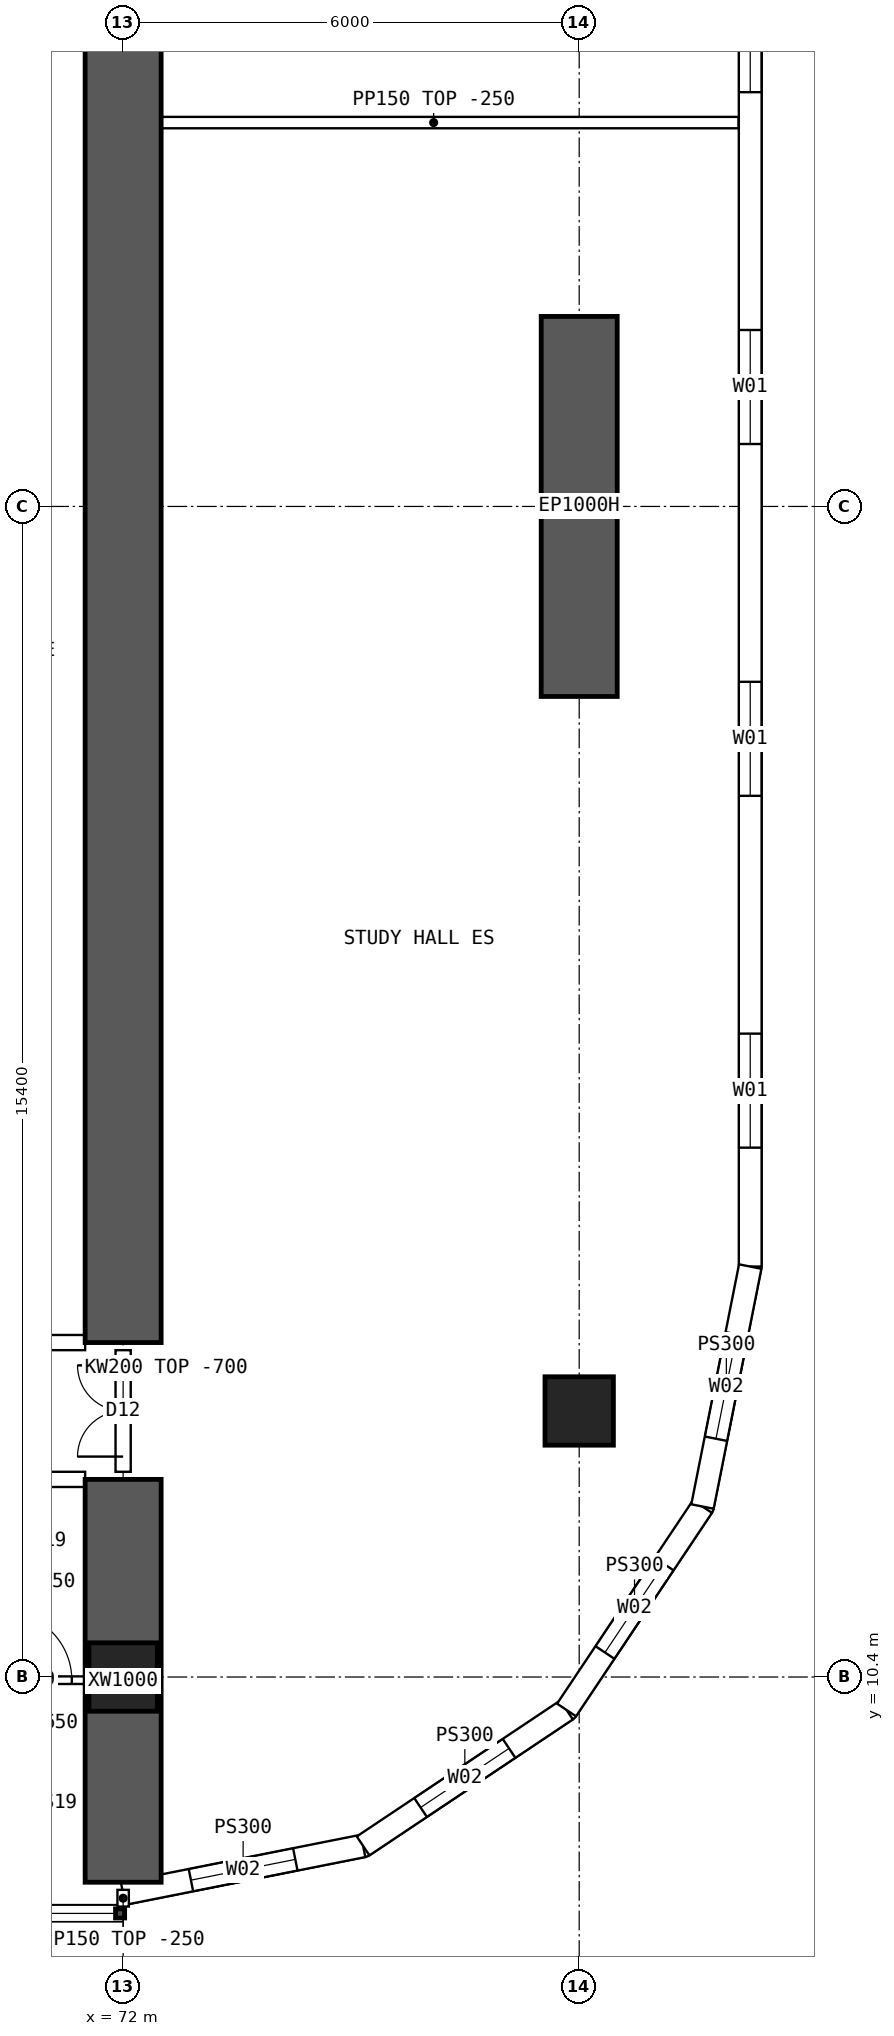
"""IFC4 building model, lengths in metres.
Left out: names, types, materials, properties, quantities, classifications, styles, units other than length and angle.
Written with IfcOpenShell. Run it as: python <this file> out.ifc"""

import sys

from ifc_helpers import new_model, si_unit, direction, frame, frame_2d, origin, origin_2d, place, context, subcontext, project, spatial, polyline, rectangle, hollow_rectangle, outline, extrude, element, fill, save


model = new_model("IFC4")
c1 = context("Model", 3, precision=1e-05, world=origin(), true_north=direction((0.0, 1.0)))
c2 = subcontext(c1, "Body", "Model", "MODEL_VIEW")
j1 = project(units=[si_unit("LENGTHUNIT", "METRE"), si_unit("PLANEANGLEUNIT", "RADIAN")], contexts=[c1])
p1 = place(None, origin())
s1 = spatial("IfcSite", under=j1, at=p1, CompositionType="ELEMENT")
p2 = place(p1, origin())
s2 = spatial("IfcBuilding", under=s1, at=p2, CompositionType="ELEMENT")
p3 = place(p2, frame((0.0, 0.0, 61.45)))
s3 = spatial("IfcBuildingStorey", under=s2, at=p3, CompositionType="ELEMENT", Elevation=61.45)
for number, where, z_axis, x_axis in (
    (1, (72.0, 10.4, 0.0), (0.0, 0.0, 1.0), (1.0, 0.0, 0.0)),
    (2, (78.0, 13.9, 0.0), (0.0, 0.0, 1.0), (1.0, 0.0, 0.0)),
):
    element("IfcColumn", number, at=place(p3, frame(where, z_axis=z_axis, x_axis=x_axis)), inside=s3, PredefinedType="COLUMN", context=c2, shape_type="SweptSolid", body=[
        extrude(hollow_rectangle(XDim=0.9, YDim=0.9, WallThickness=0.09, at=origin_2d()), origin(), (0.0, 0.0, 1.0), 3.75),
    ])
p4 = place(p3, frame((78.0, 23.3, 0.0), z_axis=(0.0, 0.0, 1.0), x_axis=(0.0, 1.0, 0.0)))
e3 = element("IfcWall", 3, at=p4, inside=s3, PredefinedType="SHEAR", context=c2, shape_type="SweptSolid", body=[
    extrude(rectangle(XDim=5.0, YDim=1.0, at=frame_2d((2.5, 0.0))), origin(), (0.0, 0.0, 1.0), 3.75),
])
p5 = place(p3, frame((72.0, 7.7, 0.0), z_axis=(0.0, 0.0, 1.0), x_axis=(0.0, 1.0, 0.0)))
e4 = element("IfcWall", 4, at=p5, inside=s3, PredefinedType="SHEAR", context=c2, shape_type="SweptSolid", body=[
    extrude(rectangle(XDim=5.3, YDim=1.0, at=frame_2d((2.65, 0.0))), origin(), (0.0, 0.0, 1.0), 3.75),
])
p6 = place(p3, frame((72.0, 14.8, 0.0), z_axis=(0.0, 0.0, 1.0), x_axis=(0.0, 1.0, 0.0)))
e5 = element("IfcWall", 5, at=p6, inside=s3, PredefinedType="SHEAR", context=c2, shape_type="SweptSolid", body=[
    extrude(rectangle(XDim=34.4, YDim=1.0, at=frame_2d((17.2, 0.0))), origin(), (0.0, 0.0, 1.0), 3.75),
])
p7 = place(p3, frame((80.25, 15.8, 0.0), z_axis=(0.0, 0.0, 1.0), x_axis=(0.0, 1.0, 0.0)))
e6 = element("IfcWall", 6, at=p7, inside=s3, PredefinedType="SOLIDWALL", context=c2, shape_type="SweptSolid", body=[
    extrude(outline(polyline([(-0.015, -0.15), (32.415, -0.15), (32.385, 0.15), (0.015, 0.15), (-0.015, -0.15)])), origin(), (0.0, 0.0, 1.0), 3.5),
])
p8 = place(p7, frame((1.564, 0.0, 0.9)))
e7 = element("IfcOpeningElement", 7, at=p8, cuts=e6, PredefinedType="OPENING", context=c2, shape_type="SweptSolid", body=[
    extrude(rectangle(XDim=1.5, YDim=2.0, at=frame_2d((0.75, 1.0))), frame((0.0, 0.16, 0.0), z_axis=(0.0, -1.0, 0.0), x_axis=(1.0, 0.0, 0.0)), (0.0, 0.0, 1.0), 0.32),
])
p9 = place(p7, frame((6.193, 0.0, 0.9)))
e8 = element("IfcOpeningElement", 8, at=p9, cuts=e6, PredefinedType="OPENING", context=c2, shape_type="SweptSolid", body=[
    extrude(rectangle(XDim=1.5, YDim=2.0, at=frame_2d((0.75, 1.0))), frame((0.0, 0.16, 0.0), z_axis=(0.0, -1.0, 0.0), x_axis=(1.0, 0.0, 0.0)), (0.0, 0.0, 1.0), 0.32),
])
p10 = place(p7, frame((10.822, 0.0, 0.9)))
e9 = element("IfcOpeningElement", 9, at=p10, cuts=e6, PredefinedType="OPENING", context=c2, shape_type="SweptSolid", body=[
    extrude(rectangle(XDim=1.5, YDim=2.0, at=frame_2d((0.75, 1.0))), frame((0.0, 0.16, 0.0), z_axis=(0.0, -1.0, 0.0), x_axis=(1.0, 0.0, 0.0)), (0.0, 0.0, 1.0), 0.32),
])
p11 = place(p7, frame((15.45, 0.0, 0.9)))
e10 = element("IfcOpeningElement", 10, at=p11, cuts=e6, PredefinedType="OPENING", context=c2, shape_type="SweptSolid", body=[
    extrude(rectangle(XDim=1.5, YDim=2.0, at=frame_2d((0.75, 1.0))), frame((0.0, 0.16, 0.0), z_axis=(0.0, -1.0, 0.0), x_axis=(1.0, 0.0, 0.0)), (0.0, 0.0, 1.0), 0.32),
])
p12 = place(p7, frame((20.079, 0.0, 0.9)))
e11 = element("IfcOpeningElement", 11, at=p12, cuts=e6, PredefinedType="OPENING", context=c2, shape_type="SweptSolid", body=[
    extrude(rectangle(XDim=1.5, YDim=2.0, at=frame_2d((0.75, 1.0))), frame((0.0, 0.16, 0.0), z_axis=(0.0, -1.0, 0.0), x_axis=(1.0, 0.0, 0.0)), (0.0, 0.0, 1.0), 0.32),
])
p13 = place(p7, frame((24.707, 0.0, 0.9)))
e12 = element("IfcOpeningElement", 12, at=p13, cuts=e6, PredefinedType="OPENING", context=c2, shape_type="SweptSolid", body=[
    extrude(rectangle(XDim=1.5, YDim=2.0, at=frame_2d((0.75, 1.0))), frame((0.0, 0.16, 0.0), z_axis=(0.0, -1.0, 0.0), x_axis=(1.0, 0.0, 0.0)), (0.0, 0.0, 1.0), 0.32),
])
p14 = place(p7, frame((29.336, 0.0, 0.9)))
e13 = element("IfcOpeningElement", 13, at=p14, cuts=e6, PredefinedType="OPENING", context=c2, shape_type="SweptSolid", body=[
    extrude(rectangle(XDim=1.5, YDim=2.0, at=frame_2d((0.75, 1.0))), frame((0.0, 0.16, 0.0), z_axis=(0.0, -1.0, 0.0), x_axis=(1.0, 0.0, 0.0)), (0.0, 0.0, 1.0), 0.32),
])
p15 = place(p3, frame((72.0, 7.55, 0.0), z_axis=(0.0, 0.0, 1.0), x_axis=(0.980787251524, 0.195080412259, 0.0)))
e14 = element("IfcWall", 14, at=p15, inside=s3, PredefinedType="SOLIDWALL", context=c2, shape_type="SweptSolid", body=[
    extrude(outline(polyline([(-0.03, -0.15), (3.249, -0.15), (3.189, 0.15), (0.03, 0.15), (-0.03, -0.15)])), origin(), (0.0, 0.0, 1.0), 3.5),
])
p16 = place(p15, frame((0.909, 0.0, 0.9)))
e15 = element("IfcOpeningElement", 15, at=p16, cuts=e14, PredefinedType="OPENING", context=c2, shape_type="SweptSolid", body=[
    extrude(rectangle(XDim=1.4, YDim=1.8, at=frame_2d((0.7, 0.9))), frame((0.0, 0.16, 0.0), z_axis=(0.0, -1.0, 0.0), x_axis=(1.0, 0.0, 0.0)), (0.0, 0.0, 1.0), 0.32),
])
p17 = place(p3, frame((75.157, 8.178, 0.0), z_axis=(0.0, 0.0, 1.0), x_axis=(0.831478105043, 0.555557522525, 0.0)))
e16 = element("IfcWall", 16, at=p17, inside=s3, PredefinedType="SOLIDWALL", context=c2, shape_type="SweptSolid", body=[
    extrude(outline(polyline([(-0.03, -0.15), (3.249, -0.15), (3.189, 0.15), (0.03, 0.15), (-0.03, -0.15)])), origin(), (0.0, 0.0, 1.0), 3.5),
])
p18 = place(p17, frame((0.909, 0.0, 0.9)))
e17 = element("IfcOpeningElement", 17, at=p18, cuts=e16, PredefinedType="OPENING", context=c2, shape_type="SweptSolid", body=[
    extrude(rectangle(XDim=1.4, YDim=1.8, at=frame_2d((0.7, 0.9))), frame((0.0, 0.16, 0.0), z_axis=(0.0, -1.0, 0.0), x_axis=(1.0, 0.0, 0.0)), (0.0, 0.0, 1.0), 0.32),
])
p19 = place(p3, frame((77.833, 9.966, 0.0), z_axis=(0.0, 0.0, 1.0), x_axis=(0.555609954424, 0.831443069936, 0.0)))
e18 = element("IfcWall", 18, at=p19, inside=s3, PredefinedType="SOLIDWALL", context=c2, shape_type="SweptSolid", body=[
    extrude(outline(polyline([(-0.03, -0.15), (3.249, -0.15), (3.189, 0.15), (0.03, 0.15), (-0.03, -0.15)])), origin(), (0.0, 0.0, 1.0), 3.5),
])
p20 = place(p19, frame((0.909, 0.0, 0.9)))
e19 = element("IfcOpeningElement", 19, at=p20, cuts=e18, PredefinedType="OPENING", context=c2, shape_type="SweptSolid", body=[
    extrude(rectangle(XDim=1.4, YDim=1.8, at=frame_2d((0.7, 0.9))), frame((0.0, 0.16, 0.0), z_axis=(0.0, -1.0, 0.0), x_axis=(1.0, 0.0, 0.0)), (0.0, 0.0, 1.0), 0.32),
])
p21 = place(p3, frame((79.622, 12.643, 0.0), z_axis=(0.0, 0.0, 1.0), x_axis=(0.195065901187, 0.980790137692, 0.0)))
e20 = element("IfcWall", 20, at=p21, inside=s3, PredefinedType="SOLIDWALL", context=c2, shape_type="SweptSolid", body=[
    extrude(outline(polyline([(-0.03, -0.15), (3.234, -0.15), (3.204, 0.15), (0.03, 0.15), (-0.03, -0.15)])), origin(), (0.0, 0.0, 1.0), 3.5),
])
p22 = place(p21, frame((0.909, 0.0, 0.9)))
e21 = element("IfcOpeningElement", 21, at=p22, cuts=e20, PredefinedType="OPENING", context=c2, shape_type="SweptSolid", body=[
    extrude(rectangle(XDim=1.4, YDim=1.8, at=frame_2d((0.7, 0.9))), frame((0.0, 0.16, 0.0), z_axis=(0.0, -1.0, 0.0), x_axis=(1.0, 0.0, 0.0)), (0.0, 0.0, 1.0), 0.32),
])
p23 = place(p3, frame((66.5, 13.0, 0.0), z_axis=(0.0, 0.0, 1.0), x_axis=(1.0, 0.0, 0.0)))
e22 = element("IfcWall", 22, at=p23, inside=s3, PredefinedType="SOLIDWALL", context=c2, shape_type="SweptSolid", body=[
    extrude(outline(polyline([(0.0, 0.0), (5.0, 0.0), (5.0, 3.1), (0.0, 3.1), (0.0, 0.0)])), frame((0.0, 0.1, 0.0), z_axis=(0.0, -1.0, 0.0), x_axis=(1.0, 0.0, 0.0)), (0.0, 0.0, 1.0), 0.2),
])
p24 = place(p23, frame((1.3, 0.0, 0.0)))
e23 = element("IfcOpeningElement", 23, at=p24, cuts=e22, PredefinedType="OPENING", context=c2, shape_type="SweptSolid", body=[
    extrude(rectangle(XDim=0.9, YDim=2.1, at=frame_2d((0.45, 1.05))), frame((0.0, 0.11, 0.0), z_axis=(0.0, -1.0, 0.0), x_axis=(1.0, 0.0, 0.0)), (0.0, 0.0, 1.0), 0.22),
])
p25 = place(p23, frame((2.675, 0.0, 0.0)))
e24 = element("IfcOpeningElement", 24, at=p25, cuts=e22, PredefinedType="OPENING", context=c2, shape_type="SweptSolid", body=[
    extrude(rectangle(XDim=0.9, YDim=2.1, at=frame_2d((0.45, 1.05))), frame((0.0, 0.11, 0.0), z_axis=(0.0, -1.0, 0.0), x_axis=(1.0, 0.0, 0.0)), (0.0, 0.0, 1.0), 0.22),
])
p26 = place(p3, frame((66.5, 14.8, 0.0), z_axis=(0.0, 0.0, 1.0), x_axis=(1.0, 0.0, 0.0)))
e25 = element("IfcWall", 25, at=p26, inside=s3, PredefinedType="SOLIDWALL", context=c2, shape_type="SweptSolid", body=[
    extrude(rectangle(XDim=5.0, YDim=0.2, at=frame_2d((2.5, 0.0))), origin(), (0.0, 0.0, 1.0), 3.5),
])
p27 = place(p26, frame((0.2, 0.0, 0.0)))
e26 = element("IfcOpeningElement", 26, at=p27, cuts=e25, PredefinedType="OPENING", context=c2, shape_type="SweptSolid", body=[
    extrude(rectangle(XDim=1.6, YDim=2.1, at=frame_2d((0.8, 1.05))), frame((0.0, 0.11, 0.0), z_axis=(0.0, -1.0, 0.0), x_axis=(1.0, 0.0, 0.0)), (0.0, 0.0, 1.0), 0.22),
])
p28 = place(p3, frame((71.55, 10.358, 0.0), z_axis=(0.0, 0.0, 1.0), x_axis=(-1.0, 0.0, 0.0)))
e27 = element("IfcWall", 27, at=p28, inside=s3, PredefinedType="PARTITIONING", context=c2, shape_type="SweptSolid", body=[
    extrude(outline(polyline([(0.0, 0.0), (1.3, 0.0), (1.3, 3.1), (0.0, 3.1), (0.0, 0.0)])), frame((0.0, 0.05, 0.0), z_axis=(0.0, -1.0, 0.0), x_axis=(1.0, 0.0, 0.0)), (0.0, 0.0, 1.0), 0.1),
])
p29 = place(p28, frame((0.225, 0.0, 0.0)))
e28 = element("IfcOpeningElement", 28, at=p29, cuts=e27, PredefinedType="OPENING", context=c2, shape_type="SweptSolid", body=[
    extrude(rectangle(XDim=0.9, YDim=2.1, at=frame_2d((0.45, 1.05))), frame((0.0, 0.06, 0.0), z_axis=(0.0, -1.0, 0.0), x_axis=(1.0, 0.0, 0.0)), (0.0, 0.0, 1.0), 0.12),
])
p30 = place(p3, frame((72.075, 30.85, 0.0), z_axis=(0.0, 0.0, 1.0), x_axis=(1.0, 0.0, 0.0)))
e29 = element("IfcWall", 29, at=p30, inside=s3, PredefinedType="PARTITIONING", context=c2, shape_type="SweptSolid", body=[
    extrude(outline(polyline([(0.0, 0.0), (8.02, 0.0), (8.02, 3.5), (6.227, 3.5), (6.225, 3.05), (5.627, 3.05), (5.625, 3.5), (0.0, 3.5), (0.0, 0.0)])), frame((0.0, 0.075, 0.0), z_axis=(0.0, -1.0, 0.0), x_axis=(1.0, 0.0, 0.0)), (0.0, 0.0, 1.0), 0.15),
])
p31 = place(p3, frame((72.0, 13.1, 0.0), z_axis=(0.0, 0.0, 1.0), x_axis=(0.0, 1.0, 0.0)))
e30 = element("IfcWall", 30, at=p31, inside=s3, PredefinedType="SOLIDWALL", context=c2, shape_type="SweptSolid", body=[
    extrude(outline(polyline([(0.0, 0.0), (1.6, 0.0), (1.6, 3.05), (0.0, 3.05), (0.0, 0.0)])), frame((0.0, 0.1, 0.0), z_axis=(0.0, -1.0, 0.0), x_axis=(1.0, 0.0, 0.0)), (0.0, 0.0, 1.0), 0.2),
])
p32 = place(p31, frame((0.2, 0.0, 0.0)))
e31 = element("IfcOpeningElement", 31, at=p32, cuts=e30, PredefinedType="OPENING", context=c2, shape_type="SweptSolid", body=[
    extrude(rectangle(XDim=1.2, YDim=2.1, at=frame_2d((0.6, 1.05))), frame((0.0, 0.11, 0.0), z_axis=(0.0, -1.0, 0.0), x_axis=(1.0, 0.0, 0.0)), (0.0, 0.0, 1.0), 0.22),
])
p33 = place(p3, frame((72.0, 7.6, 0.0), z_axis=(0.0, 0.0, 1.0), x_axis=(0.0, -1.0, 0.0)))
e32 = element("IfcWall", 32, at=p33, inside=s3, PredefinedType="PARTITIONING", context=c2, shape_type="SweptSolid", body=[
    extrude(rectangle(XDim=0.22, YDim=0.15, at=frame_2d((0.11, 0.0))), origin(), (0.0, 0.0, 1.0), 3.5),
])
p34 = place(p8, origin())
e33 = element("IfcWindow", 33, at=p34, inside=s3, PartitioningType="SINGLE_PANEL", PredefinedType="WINDOW", context=c2, shape_type="SweptSolid", body=[
    extrude(rectangle(XDim=1.5, YDim=2.0, at=frame_2d((0.75, 1.0))), frame((0.0, 0.03, 0.0), z_axis=(0.0, -1.0, 0.0), x_axis=(1.0, 0.0, 0.0)), (0.0, 0.0, 1.0), 0.06),
])
fill(e7, e33)
p35 = place(p9, origin())
e34 = element("IfcWindow", 34, at=p35, inside=s3, PartitioningType="SINGLE_PANEL", PredefinedType="WINDOW", context=c2, shape_type="SweptSolid", body=[
    extrude(rectangle(XDim=1.5, YDim=2.0, at=frame_2d((0.75, 1.0))), frame((0.0, 0.03, 0.0), z_axis=(0.0, -1.0, 0.0), x_axis=(1.0, 0.0, 0.0)), (0.0, 0.0, 1.0), 0.06),
])
fill(e8, e34)
p36 = place(p10, origin())
e35 = element("IfcWindow", 35, at=p36, inside=s3, PartitioningType="SINGLE_PANEL", PredefinedType="WINDOW", context=c2, shape_type="SweptSolid", body=[
    extrude(rectangle(XDim=1.5, YDim=2.0, at=frame_2d((0.75, 1.0))), frame((0.0, 0.03, 0.0), z_axis=(0.0, -1.0, 0.0), x_axis=(1.0, 0.0, 0.0)), (0.0, 0.0, 1.0), 0.06),
])
fill(e9, e35)
p37 = place(p11, origin())
e36 = element("IfcWindow", 36, at=p37, inside=s3, PartitioningType="SINGLE_PANEL", PredefinedType="WINDOW", context=c2, shape_type="SweptSolid", body=[
    extrude(rectangle(XDim=1.5, YDim=2.0, at=frame_2d((0.75, 1.0))), frame((0.0, 0.03, 0.0), z_axis=(0.0, -1.0, 0.0), x_axis=(1.0, 0.0, 0.0)), (0.0, 0.0, 1.0), 0.06),
])
fill(e10, e36)
p38 = place(p16, origin())
e37 = element("IfcWindow", 37, at=p38, inside=s3, PartitioningType="SINGLE_PANEL", PredefinedType="WINDOW", context=c2, shape_type="SweptSolid", body=[
    extrude(rectangle(XDim=1.4, YDim=1.8, at=frame_2d((0.7, 0.9))), frame((0.0, 0.03, 0.0), z_axis=(0.0, -1.0, 0.0), x_axis=(1.0, 0.0, 0.0)), (0.0, 0.0, 1.0), 0.06),
])
fill(e15, e37)
p39 = place(p18, origin())
e38 = element("IfcWindow", 38, at=p39, inside=s3, PartitioningType="SINGLE_PANEL", PredefinedType="WINDOW", context=c2, shape_type="SweptSolid", body=[
    extrude(rectangle(XDim=1.4, YDim=1.8, at=frame_2d((0.7, 0.9))), frame((0.0, 0.03, 0.0), z_axis=(0.0, -1.0, 0.0), x_axis=(1.0, 0.0, 0.0)), (0.0, 0.0, 1.0), 0.06),
])
fill(e17, e38)
p40 = place(p20, origin())
e39 = element("IfcWindow", 39, at=p40, inside=s3, PartitioningType="SINGLE_PANEL", PredefinedType="WINDOW", context=c2, shape_type="SweptSolid", body=[
    extrude(rectangle(XDim=1.4, YDim=1.8, at=frame_2d((0.7, 0.9))), frame((0.0, 0.03, 0.0), z_axis=(0.0, -1.0, 0.0), x_axis=(1.0, 0.0, 0.0)), (0.0, 0.0, 1.0), 0.06),
])
fill(e19, e39)
p41 = place(p22, origin())
e40 = element("IfcWindow", 40, at=p41, inside=s3, PartitioningType="SINGLE_PANEL", PredefinedType="WINDOW", context=c2, shape_type="SweptSolid", body=[
    extrude(rectangle(XDim=1.4, YDim=1.8, at=frame_2d((0.7, 0.9))), frame((0.0, 0.03, 0.0), z_axis=(0.0, -1.0, 0.0), x_axis=(1.0, 0.0, 0.0)), (0.0, 0.0, 1.0), 0.06),
])
fill(e21, e40)
p42 = place(p29, origin())
e41 = element("IfcDoor", 41, at=p42, inside=s3, OperationType="SINGLE_SWING_RIGHT", PredefinedType="DOOR", context=c2, shape_type="SweptSolid", body=[
    extrude(rectangle(XDim=0.9, YDim=2.1, at=frame_2d((0.45, 1.05))), frame((0.0, 0.025, 0.0), z_axis=(0.0, -1.0, 0.0), x_axis=(1.0, 0.0, 0.0)), (0.0, 0.0, 1.0), 0.05),
])
fill(e28, e41)
p43 = place(p32, origin())
e42 = element("IfcDoor", 42, at=p43, inside=s3, OperationType="DOUBLE_DOOR_SINGLE_SWING", PredefinedType="DOOR", context=c2, shape_type="SweptSolid", body=[
    extrude(rectangle(XDim=1.2, YDim=2.1, at=frame_2d((0.6, 1.05))), frame((0.0, 0.025, 0.0), z_axis=(0.0, -1.0, 0.0), x_axis=(1.0, 0.0, 0.0)), (0.0, 0.0, 1.0), 0.05),
])
fill(e31, e42)
save(model, sys.argv[1])
